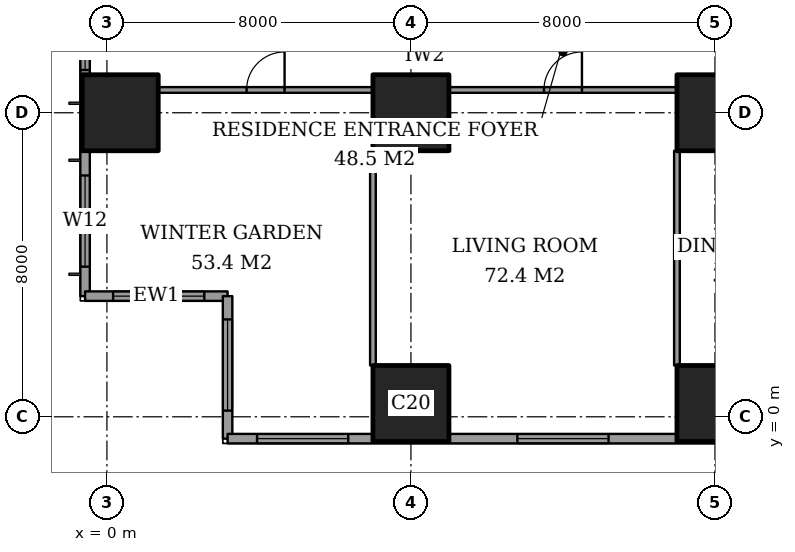
"""IFC4 building model, lengths in metres.
Left out: names, types, materials, properties, quantities, classifications, styles, units other than length and angle.
Written with IfcOpenShell. Run it as: python <this file> out.ifc"""

import sys

from ifc_helpers import new_model, si_unit, direction, frame, frame_2d, origin, origin_2d, place, context, subcontext, project, spatial, rectangle, extrude, element, fill, save


model = new_model("IFC4")
c1 = context("Model", 3, precision=1e-05, world=origin(), true_north=direction((0.0, 1.0)))
c2 = subcontext(c1, "Body", "Model", "MODEL_VIEW")
j1 = project(units=[si_unit("LENGTHUNIT", "METRE"), si_unit("PLANEANGLEUNIT", "RADIAN")], contexts=[c1])
p1 = place(None, origin())
s1 = spatial("IfcSite", under=j1, at=p1, CompositionType="ELEMENT")
p2 = place(p1, origin())
s2 = spatial("IfcBuilding", under=s1, at=p2, CompositionType="ELEMENT")
p3 = place(p2, frame((0.0, 0.0, 153.8)))
s3 = spatial("IfcBuildingStorey", under=s2, at=p3, CompositionType="ELEMENT", Elevation=153.8)
for number, where, z_axis, x_axis in (
    (1, (0.35, 8.0, 0.0), (0.0, 0.0, 1.0), (1.0, 0.0, 0.0)),
    (2, (8.0, 0.35, 0.0), (0.0, 0.0, 1.0), (1.0, 0.0, 0.0)),
    (3, (8.0, 8.0, 0.0), (0.0, 0.0, 1.0), (1.0, 0.0, 0.0)),
    (4, (16.0, 0.35, 0.0), (0.0, 0.0, 1.0), (1.0, 0.0, 0.0)),
    (5, (16.0, 8.0, 0.0), (0.0, 0.0, 1.0), (1.0, 0.0, 0.0)),
):
    element("IfcColumn", number, at=place(p3, frame(where, z_axis=z_axis, x_axis=x_axis)), inside=s3, PredefinedType="COLUMN", context=c2, shape_type="SweptSolid", body=[
        extrude(rectangle(XDim=2.0, YDim=2.0, at=origin_2d()), origin(), (0.0, 0.0, 1.0), 3.6),
    ])
p4 = place(p3, frame((-0.575, 44.825, 0.0), z_axis=(0.0, 0.0, 1.0), x_axis=(0.0, -1.0, 0.0)))
e6 = element("IfcWall", 6, at=p4, inside=s3, PredefinedType="SOLIDWALL", context=c2, shape_type="SweptSolid", body=[
    extrude(rectangle(XDim=41.65, YDim=0.25, at=frame_2d((20.825, 0.0))), origin(), (0.0, 0.0, 1.0), 3.6),
])
p5 = place(p4, frame((0.775, 0.0, 0.4)))
e7 = element("IfcOpeningElement", 7, at=p5, cuts=e6, PredefinedType="OPENING", context=c2, shape_type="SweptSolid", body=[
    extrude(rectangle(XDim=2.4, YDim=2.2, at=frame_2d((1.2, 1.1))), frame((0.0, 0.135, 0.0), z_axis=(0.0, -1.0, 0.0), x_axis=(1.0, 0.0, 0.0)), (0.0, 0.0, 1.0), 0.27),
])
p6 = place(p4, frame((6.1, 0.0, 0.4)))
e8 = element("IfcOpeningElement", 8, at=p6, cuts=e6, PredefinedType="OPENING", context=c2, shape_type="SweptSolid", body=[
    extrude(rectangle(XDim=1.2, YDim=2.2, at=frame_2d((0.6, 1.1))), frame((0.0, 0.135, 0.0), z_axis=(0.0, -1.0, 0.0), x_axis=(1.0, 0.0, 0.0)), (0.0, 0.0, 1.0), 0.27),
])
p7 = place(p4, frame((8.425, 0.0, 0.4)))
e9 = element("IfcOpeningElement", 9, at=p7, cuts=e6, PredefinedType="OPENING", context=c2, shape_type="SweptSolid", body=[
    extrude(rectangle(XDim=2.4, YDim=2.2, at=frame_2d((1.2, 1.1))), frame((0.0, 0.135, 0.0), z_axis=(0.0, -1.0, 0.0), x_axis=(1.0, 0.0, 0.0)), (0.0, 0.0, 1.0), 0.27),
])
p8 = place(p4, frame((15.625, 0.0, 0.4)))
e10 = element("IfcOpeningElement", 10, at=p8, cuts=e6, PredefinedType="OPENING", context=c2, shape_type="SweptSolid", body=[
    extrude(rectangle(XDim=2.4, YDim=2.2, at=frame_2d((1.2, 1.1))), frame((0.0, 0.135, 0.0), z_axis=(0.0, -1.0, 0.0), x_axis=(1.0, 0.0, 0.0)), (0.0, 0.0, 1.0), 0.27),
])
p9 = place(p4, frame((23.625, 0.0, 0.4)))
e11 = element("IfcOpeningElement", 11, at=p9, cuts=e6, PredefinedType="OPENING", context=c2, shape_type="SweptSolid", body=[
    extrude(rectangle(XDim=2.4, YDim=2.2, at=frame_2d((1.2, 1.1))), frame((0.0, 0.135, 0.0), z_axis=(0.0, -1.0, 0.0), x_axis=(1.0, 0.0, 0.0)), (0.0, 0.0, 1.0), 0.27),
])
p10 = place(p4, frame((30.825, 0.0, 0.4)))
e12 = element("IfcOpeningElement", 12, at=p10, cuts=e6, PredefinedType="OPENING", context=c2, shape_type="SweptSolid", body=[
    extrude(rectangle(XDim=2.4, YDim=2.2, at=frame_2d((1.2, 1.1))), frame((0.0, 0.135, 0.0), z_axis=(0.0, -1.0, 0.0), x_axis=(1.0, 0.0, 0.0)), (0.0, 0.0, 1.0), 0.27),
])
p11 = place(p4, frame((34.5, 0.0, 0.4)))
e13 = element("IfcOpeningElement", 13, at=p11, cuts=e6, PredefinedType="OPENING", context=c2, shape_type="SweptSolid", body=[
    extrude(rectangle(XDim=1.2, YDim=2.2, at=frame_2d((0.6, 1.1))), frame((0.0, 0.135, 0.0), z_axis=(0.0, -1.0, 0.0), x_axis=(1.0, 0.0, 0.0)), (0.0, 0.0, 1.0), 0.27),
])
p12 = place(p4, frame((38.475, 0.0, 0.4)))
e14 = element("IfcOpeningElement", 14, at=p12, cuts=e6, PredefinedType="OPENING", context=c2, shape_type="SweptSolid", body=[
    extrude(rectangle(XDim=2.4, YDim=2.2, at=frame_2d((1.2, 1.1))), frame((0.0, 0.135, 0.0), z_axis=(0.0, -1.0, 0.0), x_axis=(1.0, 0.0, 0.0)), (0.0, 0.0, 1.0), 0.27),
])
p13 = place(p3, frame((-0.575, 3.175, 0.0), z_axis=(0.0, 0.0, 1.0), x_axis=(1.0, 0.0, 0.0)))
e15 = element("IfcWall", 15, at=p13, inside=s3, PredefinedType="SOLIDWALL", context=c2, shape_type="SweptSolid", body=[
    extrude(rectangle(XDim=3.75, YDim=0.25, at=frame_2d((1.875, 0.0))), origin(), (0.0, 0.0, 1.0), 3.6),
])
p14 = place(p13, frame((0.738, 0.0, 0.4)))
e16 = element("IfcOpeningElement", 16, at=p14, cuts=e15, PredefinedType="OPENING", context=c2, shape_type="SweptSolid", body=[
    extrude(rectangle(XDim=2.4, YDim=2.2, at=frame_2d((1.2, 1.1))), frame((0.0, 0.135, 0.0), z_axis=(0.0, -1.0, 0.0), x_axis=(1.0, 0.0, 0.0)), (0.0, 0.0, 1.0), 0.27),
])
p15 = place(p3, frame((3.175, 3.175, 0.0), z_axis=(0.0, 0.0, 1.0), x_axis=(0.0, -1.0, 0.0)))
e17 = element("IfcWall", 17, at=p15, inside=s3, PredefinedType="SOLIDWALL", context=c2, shape_type="SweptSolid", body=[
    extrude(rectangle(XDim=3.75, YDim=0.25, at=frame_2d((1.875, 0.0))), origin(), (0.0, 0.0, 1.0), 3.6),
])
p16 = place(p15, frame((0.613, 0.0, 0.4)))
e18 = element("IfcOpeningElement", 18, at=p16, cuts=e17, PredefinedType="OPENING", context=c2, shape_type="SweptSolid", body=[
    extrude(rectangle(XDim=2.4, YDim=2.2, at=frame_2d((1.2, 1.1))), frame((0.0, 0.135, 0.0), z_axis=(0.0, -1.0, 0.0), x_axis=(1.0, 0.0, 0.0)), (0.0, 0.0, 1.0), 0.27),
])
p17 = place(p3, frame((3.175, -0.575, 0.0), z_axis=(0.0, 0.0, 1.0), x_axis=(1.0, 0.0, 0.0)))
e19 = element("IfcWall", 19, at=p17, inside=s3, PredefinedType="SOLIDWALL", context=c2, shape_type="SweptSolid", body=[
    extrude(rectangle(XDim=21.4, YDim=0.25, at=frame_2d((10.7, 0.0))), origin(), (0.0, 0.0, 1.0), 3.6),
])
p18 = place(p17, frame((0.775, 0.0, 0.4)))
e20 = element("IfcOpeningElement", 20, at=p18, cuts=e19, PredefinedType="OPENING", context=c2, shape_type="SweptSolid", body=[
    extrude(rectangle(XDim=2.4, YDim=2.2, at=frame_2d((1.2, 1.1))), frame((0.0, 0.135, 0.0), z_axis=(0.0, -1.0, 0.0), x_axis=(1.0, 0.0, 0.0)), (0.0, 0.0, 1.0), 0.27),
])
p19 = place(p17, frame((7.625, 0.0, 0.4)))
e21 = element("IfcOpeningElement", 21, at=p19, cuts=e19, PredefinedType="OPENING", context=c2, shape_type="SweptSolid", body=[
    extrude(rectangle(XDim=2.4, YDim=2.2, at=frame_2d((1.2, 1.1))), frame((0.0, 0.135, 0.0), z_axis=(0.0, -1.0, 0.0), x_axis=(1.0, 0.0, 0.0)), (0.0, 0.0, 1.0), 0.27),
])
p20 = place(p17, frame((14.225, 0.0, 0.4)))
e22 = element("IfcOpeningElement", 22, at=p20, cuts=e19, PredefinedType="OPENING", context=c2, shape_type="SweptSolid", body=[
    extrude(rectangle(XDim=1.2, YDim=2.2, at=frame_2d((0.6, 1.1))), frame((0.0, 0.135, 0.0), z_axis=(0.0, -1.0, 0.0), x_axis=(1.0, 0.0, 0.0)), (0.0, 0.0, 1.0), 0.27),
])
p21 = place(p17, frame((16.1, 0.0, 0.4)))
e23 = element("IfcOpeningElement", 23, at=p21, cuts=e19, PredefinedType="OPENING", context=c2, shape_type="SweptSolid", body=[
    extrude(rectangle(XDim=1.2, YDim=2.2, at=frame_2d((0.6, 1.1))), frame((0.0, 0.135, 0.0), z_axis=(0.0, -1.0, 0.0), x_axis=(1.0, 0.0, 0.0)), (0.0, 0.0, 1.0), 0.27),
])
p22 = place(p17, frame((17.85, 0.0, 0.4)))
e24 = element("IfcOpeningElement", 24, at=p22, cuts=e19, PredefinedType="OPENING", context=c2, shape_type="SweptSolid", body=[
    extrude(rectangle(XDim=1.2, YDim=2.2, at=frame_2d((0.6, 1.1))), frame((0.0, 0.135, 0.0), z_axis=(0.0, -1.0, 0.0), x_axis=(1.0, 0.0, 0.0)), (0.0, 0.0, 1.0), 0.27),
])
p23 = place(p3, frame((1.35, 8.6, 0.0), z_axis=(0.0, 0.0, 1.0), x_axis=(1.0, 0.0, 0.0)))
e25 = element("IfcWall", 25, at=p23, inside=s3, PredefinedType="PARTITIONING", context=c2, shape_type="SweptSolid", body=[
    extrude(rectangle(XDim=5.65, YDim=0.15, at=frame_2d((2.825, 0.0))), origin(), (0.0, 0.0, 1.0), 3.35),
])
p24 = place(p23, frame((2.325, 0.0, 0.0)))
e26 = element("IfcOpeningElement", 26, at=p24, cuts=e25, PredefinedType="OPENING", context=c2, shape_type="SweptSolid", body=[
    extrude(rectangle(XDim=1.0, YDim=2.1, at=frame_2d((0.5, 1.05))), frame((0.0, 0.085, 0.0), z_axis=(0.0, -1.0, 0.0), x_axis=(1.0, 0.0, 0.0)), (0.0, 0.0, 1.0), 0.17),
])
p25 = place(p3, frame((9.0, 8.6, 0.0), z_axis=(0.0, 0.0, 1.0), x_axis=(1.0, 0.0, 0.0)))
e27 = element("IfcWall", 27, at=p25, inside=s3, PredefinedType="PARTITIONING", context=c2, shape_type="SweptSolid", body=[
    extrude(rectangle(XDim=6.0, YDim=0.15, at=frame_2d((3.0, 0.0))), origin(), (0.0, 0.0, 1.0), 3.35),
])
p26 = place(p25, frame((2.5, 0.0, 0.0)))
e28 = element("IfcOpeningElement", 28, at=p26, cuts=e27, PredefinedType="OPENING", context=c2, shape_type="SweptSolid", body=[
    extrude(rectangle(XDim=1.0, YDim=2.1, at=frame_2d((0.5, 1.05))), frame((0.0, 0.085, 0.0), z_axis=(0.0, -1.0, 0.0), x_axis=(1.0, 0.0, 0.0)), (0.0, 0.0, 1.0), 0.17),
])
for number, where, z_axis, x_axis in (
    (29, (7.0, 1.35, 0.0), (0.0, 0.0, 1.0), (0.0, 1.0, 0.0)),
    (30, (15.0, 1.35, 0.0), (0.0, 0.0, 1.0), (0.0, 1.0, 0.0)),
):
    element("IfcWall", number, at=place(p3, frame(where, z_axis=z_axis, x_axis=x_axis)), inside=s3, PredefinedType="PARTITIONING", context=c2, shape_type="SweptSolid", body=[
        extrude(rectangle(XDim=5.65, YDim=0.15, at=frame_2d((2.825, 0.0))), origin(), (0.0, 0.0, 1.0), 3.35),
    ])
p27 = place(p11, origin())
e31 = element("IfcWindow", 31, at=p27, inside=s3, PartitioningType="SINGLE_PANEL", PredefinedType="WINDOW", context=c2, shape_type="SweptSolid", body=[
    extrude(rectangle(XDim=1.2, YDim=2.2, at=frame_2d((0.6, 1.1))), frame((0.0, 0.03, 0.0), z_axis=(0.0, -1.0, 0.0), x_axis=(1.0, 0.0, 0.0)), (0.0, 0.0, 1.0), 0.06),
])
fill(e13, e31)
p28 = place(p12, origin())
e32 = element("IfcWindow", 32, at=p28, inside=s3, PartitioningType="SINGLE_PANEL", PredefinedType="WINDOW", context=c2, shape_type="SweptSolid", body=[
    extrude(rectangle(XDim=2.4, YDim=2.2, at=frame_2d((1.2, 1.1))), frame((0.0, 0.03, 0.0), z_axis=(0.0, -1.0, 0.0), x_axis=(1.0, 0.0, 0.0)), (0.0, 0.0, 1.0), 0.06),
])
fill(e14, e32)
p29 = place(p14, origin())
e33 = element("IfcWindow", 33, at=p29, inside=s3, PartitioningType="SINGLE_PANEL", PredefinedType="WINDOW", context=c2, shape_type="SweptSolid", body=[
    extrude(rectangle(XDim=2.4, YDim=2.2, at=frame_2d((1.2, 1.1))), frame((0.0, 0.03, 0.0), z_axis=(0.0, -1.0, 0.0), x_axis=(1.0, 0.0, 0.0)), (0.0, 0.0, 1.0), 0.06),
])
fill(e16, e33)
p30 = place(p16, origin())
e34 = element("IfcWindow", 34, at=p30, inside=s3, PartitioningType="SINGLE_PANEL", PredefinedType="WINDOW", context=c2, shape_type="SweptSolid", body=[
    extrude(rectangle(XDim=2.4, YDim=2.2, at=frame_2d((1.2, 1.1))), frame((0.0, 0.03, 0.0), z_axis=(0.0, -1.0, 0.0), x_axis=(1.0, 0.0, 0.0)), (0.0, 0.0, 1.0), 0.06),
])
fill(e18, e34)
p31 = place(p18, origin())
e35 = element("IfcWindow", 35, at=p31, inside=s3, PartitioningType="SINGLE_PANEL", PredefinedType="WINDOW", context=c2, shape_type="SweptSolid", body=[
    extrude(rectangle(XDim=2.4, YDim=2.2, at=frame_2d((1.2, 1.1))), frame((0.0, 0.03, 0.0), z_axis=(0.0, -1.0, 0.0), x_axis=(1.0, 0.0, 0.0)), (0.0, 0.0, 1.0), 0.06),
])
fill(e20, e35)
p32 = place(p19, origin())
e36 = element("IfcWindow", 36, at=p32, inside=s3, PartitioningType="SINGLE_PANEL", PredefinedType="WINDOW", context=c2, shape_type="SweptSolid", body=[
    extrude(rectangle(XDim=2.4, YDim=2.2, at=frame_2d((1.2, 1.1))), frame((0.0, 0.03, 0.0), z_axis=(0.0, -1.0, 0.0), x_axis=(1.0, 0.0, 0.0)), (0.0, 0.0, 1.0), 0.06),
])
fill(e21, e36)
p33 = place(p24, origin())
e37 = element("IfcDoor", 37, at=p33, inside=s3, OperationType="SINGLE_SWING_LEFT", PredefinedType="DOOR", context=c2, shape_type="SweptSolid", body=[
    extrude(rectangle(XDim=1.0, YDim=2.1, at=frame_2d((0.5, 1.05))), frame((0.0, 0.025, 0.0), z_axis=(0.0, -1.0, 0.0), x_axis=(1.0, 0.0, 0.0)), (0.0, 0.0, 1.0), 0.05),
])
fill(e26, e37)
p34 = place(p26, origin())
e38 = element("IfcDoor", 38, at=p34, inside=s3, OperationType="SINGLE_SWING_LEFT", PredefinedType="DOOR", context=c2, shape_type="SweptSolid", body=[
    extrude(rectangle(XDim=1.0, YDim=2.1, at=frame_2d((0.5, 1.05))), frame((0.0, 0.025, 0.0), z_axis=(0.0, -1.0, 0.0), x_axis=(1.0, 0.0, 0.0)), (0.0, 0.0, 1.0), 0.05),
])
fill(e28, e38)
save(model, sys.argv[1])
